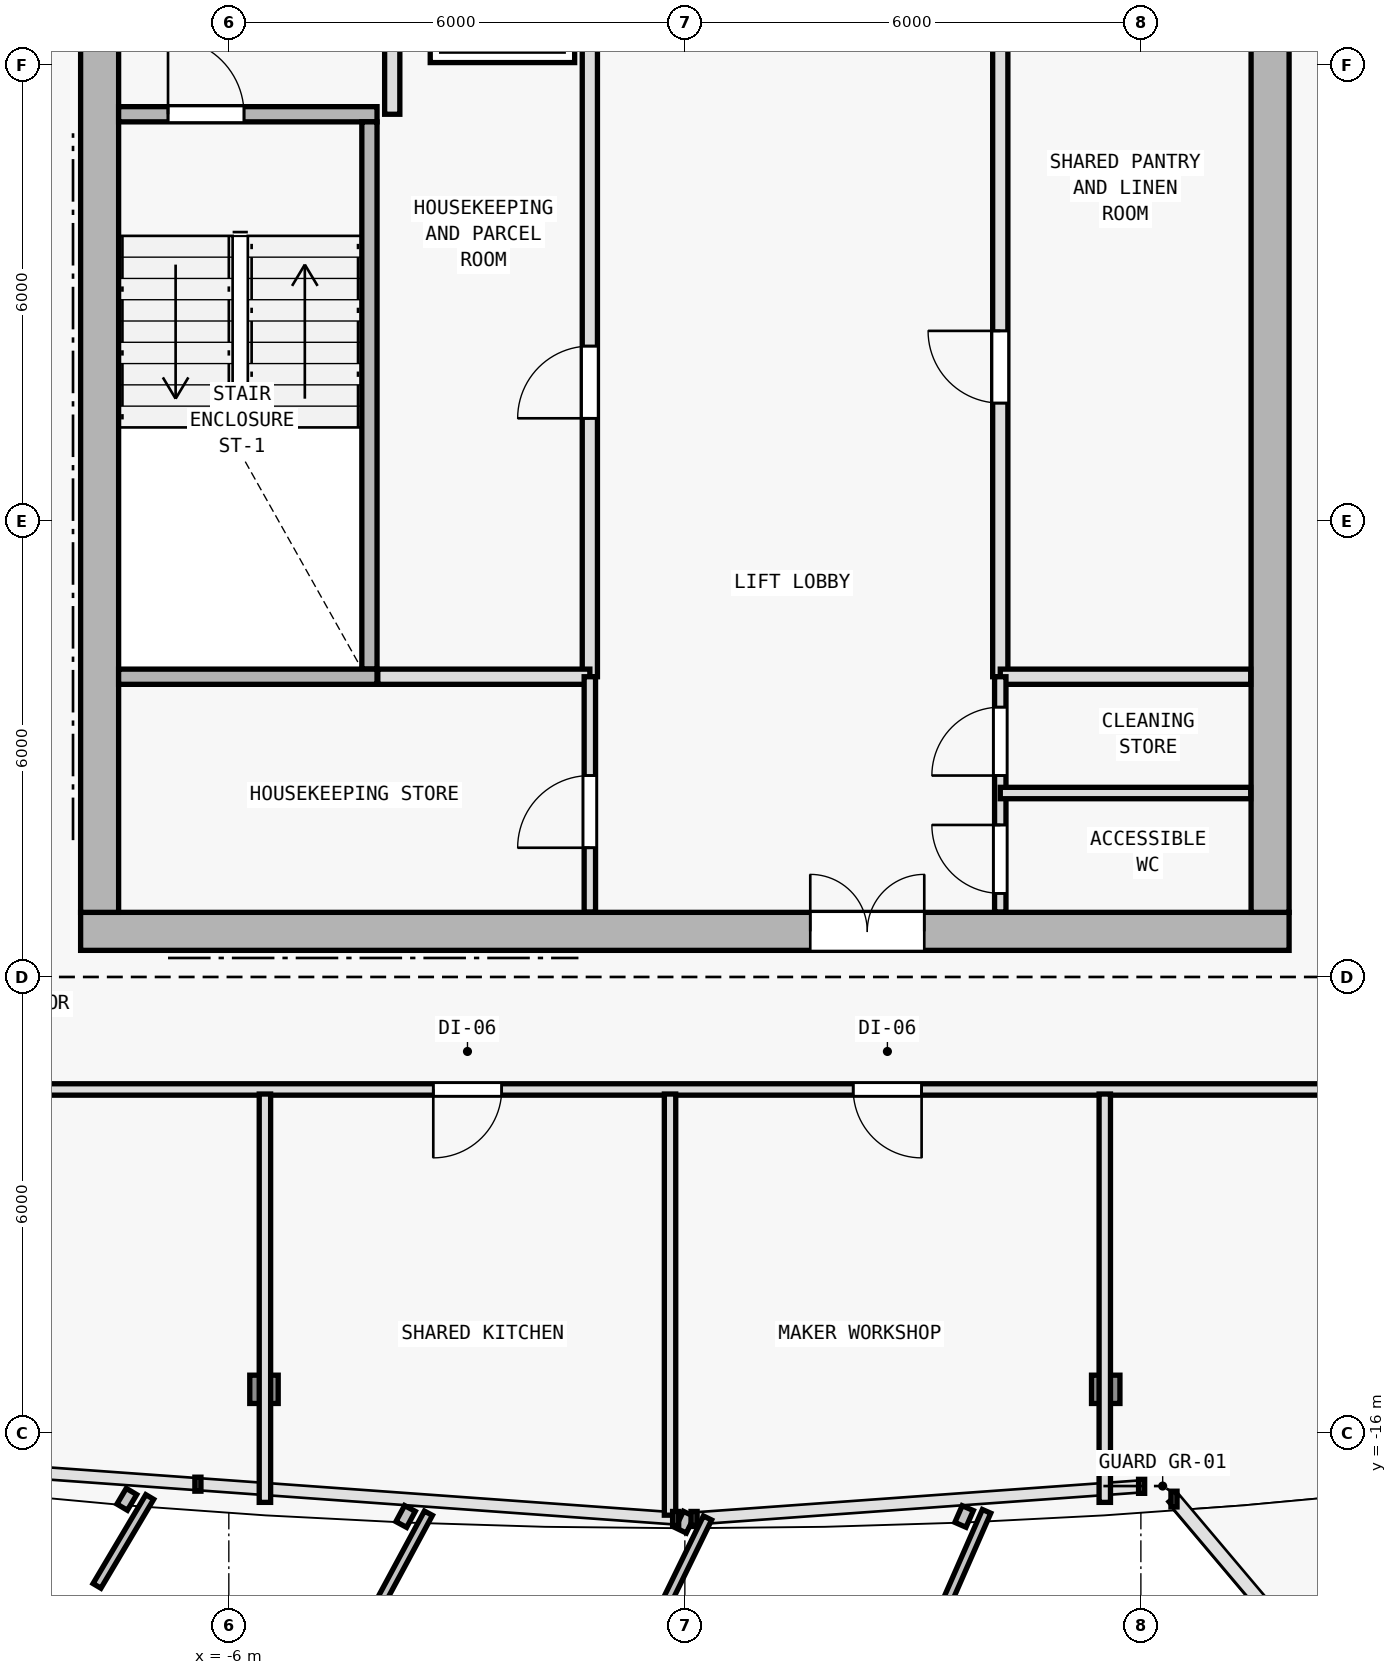
"""IFC4 building model, lengths in metres.
Left out: names, types, materials, properties, quantities, classifications, styles, units other than length and angle.
Written with IfcOpenShell. Run it as: python <this file> out.ifc"""

import sys

from ifc_helpers import new_model, si_unit, direction, frame, frame_2d, origin, origin_2d, place, context, subcontext, project, spatial, rectangle, i_section, extrude, element, fill, save


model = new_model("IFC4")
c1 = context("Model", 3, precision=1e-05, world=origin(), true_north=direction((0.0, 1.0)))
c2 = subcontext(c1, "Body", "Model", "MODEL_VIEW")
j1 = project(units=[si_unit("LENGTHUNIT", "METRE"), si_unit("PLANEANGLEUNIT", "RADIAN")], contexts=[c1])
p1 = place(None, origin())
s1 = spatial("IfcSite", under=j1, at=p1, CompositionType="ELEMENT")
p2 = place(p1, origin())
s2 = spatial("IfcBuilding", under=s1, at=p2, CompositionType="ELEMENT")
p3 = place(p2, frame((0.0, 0.0, 219.9)))
s3 = spatial("IfcBuildingStorey", under=s2, at=p3, CompositionType="ELEMENT", Elevation=219.9)
for number, where, z_axis, x_axis in (
    (1, (-7.7, -9.4, 0.0), (0.0, 0.0, 1.0), (1.0, 0.0, 0.0)),
    (2, (7.7, -9.4, 0.0), (0.0, 0.0, 1.0), (1.0, 0.0, 0.0)),
    (3, (0.0, -9.4, 0.0), (0.0, 0.0, 1.0), (1.0, 0.0, 0.0)),
    (4, (7.7, 0.4, 0.0), (0.0, 0.0, 1.0), (1.0, 0.0, 0.0)),
    (5, (-7.7, 2.0, 0.0), (0.0, 0.0, 1.0), (1.0, 0.0, 0.0)),
):
    element("IfcColumn", number, at=place(p3, frame(where, z_axis=z_axis, x_axis=x_axis)), inside=s3, PredefinedType="COLUMN", context=c2, shape_type="SweptSolid", body=[
        extrude(i_section(OverallWidth=0.398, OverallDepth=0.387, WebThickness=0.013, FlangeThickness=0.022, FilletRadius=0.015, at=origin_2d()), origin(), (0.0, 0.0, 1.0), 3.6),
    ])
for number, where, z_axis, x_axis in (
    (6, (-5.537, -15.425, 0.006), (0.007, 0.035, 0.999), (-0.982, 0.191, 0.0)),
    (7, (5.537, -15.425, 0.006), (-0.007, 0.035, 0.999), (-0.982, -0.191, 0.0)),
):
    element("IfcColumn", number, at=place(p3, frame(where, z_axis=z_axis, x_axis=x_axis)), inside=s3, PredefinedType="COLUMN", context=c2, shape_type="SweptSolid", body=[
        extrude(i_section(OverallWidth=0.374, OverallDepth=0.372, WebThickness=0.012, FlangeThickness=0.02, FilletRadius=0.015, at=origin_2d()), origin(), (0.0, 0.0, 1.0), 3.591),
    ])
p4 = place(p3, frame((-7.95, -9.4, 0.0), z_axis=(0.0, 0.0, 1.0), x_axis=(1.0, 0.0, 0.0)))
e8 = element("IfcWall", 8, at=p4, inside=s3, PredefinedType="SHEAR", context=c2, shape_type="SweptSolid", body=[
    extrude(rectangle(XDim=15.9, YDim=0.5, at=frame_2d((7.95, 0.0))), origin(), (0.0, 0.0, 1.0), 3.35),
])
p5 = place(p4, frame((9.6, 0.0, 0.0)))
e9 = element("IfcOpeningElement", 9, at=p5, cuts=e8, PredefinedType="OPENING", context=c2, shape_type="SweptSolid", body=[
    extrude(rectangle(XDim=1.5, YDim=2.2, at=frame_2d((0.75, 1.1))), frame((0.0, 0.26, 0.0), z_axis=(0.0, -1.0, 0.0), x_axis=(1.0, 0.0, 0.0)), (0.0, 0.0, 1.0), 0.52),
])
p6 = place(p3, frame((-7.7, -9.15, 0.0), z_axis=(0.0, 0.0, 1.0), x_axis=(0.0, 1.0, 0.0)))
e10 = element("IfcWall", 10, at=p6, inside=s3, PredefinedType="SHEAR", context=c2, shape_type="SweptSolid", body=[
    extrude(rectangle(XDim=19.1, YDim=0.5, at=frame_2d((9.55, 0.0))), origin(), (0.0, 0.0, 1.0), 3.35),
])
p7 = place(p6, frame((12.7, 0.0, 0.0)))
e11 = element("IfcOpeningElement", 11, at=p7, cuts=e10, PredefinedType="OPENING", context=c2, shape_type="SweptSolid", body=[
    extrude(rectangle(XDim=1.1, YDim=2.15, at=frame_2d((0.55, 1.075))), frame((0.0, 0.26, 0.0), z_axis=(0.0, -1.0, 0.0), x_axis=(1.0, 0.0, 0.0)), (0.0, 0.0, 1.0), 0.52),
])
p8 = place(p3, frame((7.7, 9.95, 0.0), z_axis=(0.0, 0.0, 1.0), x_axis=(0.0, -1.0, 0.0)))
e12 = element("IfcWall", 12, at=p8, inside=s3, PredefinedType="SHEAR", context=c2, shape_type="SweptSolid", body=[
    extrude(rectangle(XDim=19.1, YDim=0.5, at=frame_2d((9.55, 0.0))), origin(), (0.0, 0.0, 1.0), 3.35),
])
p9 = place(p3, frame((-7.45, 1.35, 0.0), z_axis=(0.0, 0.0, 1.0), x_axis=(1.0, 0.0, 0.0)))
e13 = element("IfcWall", 13, at=p9, inside=s3, PredefinedType="SOLIDWALL", context=c2, shape_type="SweptSolid", body=[
    extrude(rectangle(XDim=3.4, YDim=0.2, at=frame_2d((1.7, 0.0))), origin(), (0.0, 0.0, 1.0), 3.35),
])
p10 = place(p9, frame((0.65, 0.0, 0.0)))
e14 = element("IfcOpeningElement", 14, at=p10, cuts=e13, PredefinedType="OPENING", context=c2, shape_type="SweptSolid", body=[
    extrude(rectangle(XDim=1.0, YDim=2.15, at=frame_2d((0.5, 1.075))), frame((0.0, 0.11, 0.0), z_axis=(0.0, -1.0, 0.0), x_axis=(1.0, 0.0, 0.0)), (0.0, 0.0, 1.0), 0.22),
])
p11 = place(p3, frame((-4.15, -5.95, 0.0), z_axis=(0.0, 0.0, 1.0), x_axis=(0.0, 1.0, 0.0)))
e15 = element("IfcWall", 15, at=p11, inside=s3, PredefinedType="SOLIDWALL", context=c2, shape_type="SweptSolid", body=[
    extrude(rectangle(XDim=7.2, YDim=0.2, at=frame_2d((3.6, 0.0))), origin(), (0.0, 0.0, 1.0), 3.35),
])
p12 = place(p3, frame((-3.85, 1.35, 0.0), z_axis=(0.0, 0.0, 1.0), x_axis=(0.0, 1.0, 0.0)))
e16 = element("IfcWall", 16, at=p12, inside=s3, PredefinedType="SOLIDWALL", context=c2, shape_type="SweptSolid", body=[
    extrude(rectangle(XDim=8.595, YDim=0.2, at=frame_2d((4.297, 0.0))), origin(), (0.0, 0.0, 1.0), 3.35),
])
p13 = place(p12, frame((1.5, 0.0, 0.0)))
e17 = element("IfcOpeningElement", 17, at=p13, cuts=e16, PredefinedType="OPENING", context=c2, shape_type="SweptSolid", body=[
    extrude(rectangle(XDim=1.0, YDim=2.15, at=frame_2d((0.5, 1.075))), frame((0.0, 0.11, 0.0), z_axis=(0.0, -1.0, 0.0), x_axis=(1.0, 0.0, 0.0)), (0.0, 0.0, 1.0), 0.22),
])
p14 = place(p12, frame((3.18, 0.0, 0.0)))
e18 = element("IfcOpeningElement", 18, at=p14, cuts=e16, PredefinedType="OPENING", context=c2, shape_type="SweptSolid", body=[
    extrude(rectangle(XDim=1.0, YDim=2.15, at=frame_2d((0.5, 1.075))), frame((0.0, 0.11, 0.0), z_axis=(0.0, -1.0, 0.0), x_axis=(1.0, 0.0, 0.0)), (0.0, 0.0, 1.0), 0.22),
])
p15 = place(p3, frame((4.15, -6.05, 0.0), z_axis=(0.0, 0.0, 1.0), x_axis=(0.0, 1.0, 0.0)))
e19 = element("IfcWall", 19, at=p15, inside=s3, PredefinedType="SOLIDWALL", context=c2, shape_type="SweptSolid", body=[
    extrude(rectangle(XDim=8.7, YDim=0.2, at=frame_2d((4.35, 0.0))), origin(), (0.0, 0.0, 1.0), 3.35),
])
p16 = place(p15, frame((3.6, 0.0, 0.0)))
e20 = element("IfcOpeningElement", 20, at=p16, cuts=e19, PredefinedType="OPENING", context=c2, shape_type="SweptSolid", body=[
    extrude(rectangle(XDim=0.95, YDim=2.1, at=frame_2d((0.475, 1.05))), frame((0.0, 0.11, 0.0), z_axis=(0.0, -1.0, 0.0), x_axis=(1.0, 0.0, 0.0)), (0.0, 0.0, 1.0), 0.22),
])
p17 = place(p3, frame((-1.25, -6.05, 0.0), z_axis=(0.0, 0.0, 1.0), x_axis=(0.0, 1.0, 0.0)))
e21 = element("IfcWall", 21, at=p17, inside=s3, PredefinedType="SOLIDWALL", context=c2, shape_type="SweptSolid", body=[
    extrude(rectangle(XDim=8.7, YDim=0.2, at=frame_2d((4.35, 0.0))), origin(), (0.0, 0.0, 1.0), 3.35),
])
p18 = place(p17, frame((3.4, 0.0, 0.0)))
e22 = element("IfcOpeningElement", 22, at=p18, cuts=e21, PredefinedType="OPENING", context=c2, shape_type="SweptSolid", body=[
    extrude(rectangle(XDim=0.95, YDim=2.1, at=frame_2d((0.475, 1.05))), frame((0.0, 0.11, 0.0), z_axis=(0.0, -1.0, 0.0), x_axis=(1.0, 0.0, 0.0)), (0.0, 0.0, 1.0), 0.22),
])
p19 = place(p3, frame((-7.45, -6.05, 0.0), z_axis=(0.0, 0.0, 1.0), x_axis=(1.0, 0.0, 0.0)))
e23 = element("IfcWall", 23, at=p19, inside=s3, PredefinedType="SOLIDWALL", context=c2, shape_type="SweptSolid", body=[
    extrude(rectangle(XDim=3.4, YDim=0.2, at=frame_2d((1.7, 0.0))), origin(), (0.0, 0.0, 1.0), 3.35),
])
p20 = place(p3, frame((-4.04, -6.05, 0.0), z_axis=(0.0, 0.0, 1.0), x_axis=(1.0, 0.0, 0.0)))
e24 = element("IfcWall", 24, at=p20, inside=s3, PredefinedType="SOLIDWALL", context=c2, shape_type="SweptSolid", body=[
    extrude(rectangle(XDim=2.79, YDim=0.2, at=frame_2d((1.395, 0.0))), origin(), (0.0, 0.0, 1.0), 3.35),
])
p21 = place(p3, frame((4.15, -6.05, 0.0), z_axis=(0.0, 0.0, 1.0), x_axis=(1.0, 0.0, 0.0)))
e25 = element("IfcWall", 25, at=p21, inside=s3, PredefinedType="SOLIDWALL", context=c2, shape_type="SweptSolid", body=[
    extrude(rectangle(XDim=3.295, YDim=0.2, at=frame_2d((1.647, 0.0))), origin(), (0.0, 0.0, 1.0), 3.35),
])
p22 = place(p3, frame((-1.25, -9.145, 0.0), z_axis=(0.0, 0.0, 1.0), x_axis=(0.0, 1.0, 0.0)))
e26 = element("IfcWall", 26, at=p22, inside=s3, PredefinedType="PARTITIONING", context=c2, shape_type="SweptSolid", body=[
    extrude(rectangle(XDim=3.095, YDim=0.15, at=frame_2d((1.547, 0.0))), origin(), (0.0, 0.0, 1.0), 3.35),
])
p23 = place(p22, frame((0.845, 0.0, 0.0)))
e27 = element("IfcOpeningElement", 27, at=p23, cuts=e26, PredefinedType="OPENING", context=c2, shape_type="SweptSolid", body=[
    extrude(rectangle(XDim=0.95, YDim=2.1, at=frame_2d((0.475, 1.05))), frame((0.0, 0.085, 0.0), z_axis=(0.0, -1.0, 0.0), x_axis=(1.0, 0.0, 0.0)), (0.0, 0.0, 1.0), 0.17),
])
p24 = place(p3, frame((4.15, -9.145, 0.0), z_axis=(0.0, 0.0, 1.0), x_axis=(0.0, 1.0, 0.0)))
e28 = element("IfcWall", 28, at=p24, inside=s3, PredefinedType="PARTITIONING", context=c2, shape_type="SweptSolid", body=[
    extrude(rectangle(XDim=3.095, YDim=0.15, at=frame_2d((1.547, 0.0))), origin(), (0.0, 0.0, 1.0), 3.35),
])
p25 = place(p24, frame((0.245, 0.0, 0.0)))
e29 = element("IfcOpeningElement", 29, at=p25, cuts=e28, PredefinedType="OPENING", context=c2, shape_type="SweptSolid", body=[
    extrude(rectangle(XDim=0.9, YDim=2.1, at=frame_2d((0.45, 1.05))), frame((0.0, 0.085, 0.0), z_axis=(0.0, -1.0, 0.0), x_axis=(1.0, 0.0, 0.0)), (0.0, 0.0, 1.0), 0.17),
])
p26 = place(p24, frame((1.795, 0.0, 0.0)))
e30 = element("IfcOpeningElement", 30, at=p26, cuts=e28, PredefinedType="OPENING", context=c2, shape_type="SweptSolid", body=[
    extrude(rectangle(XDim=0.9, YDim=2.1, at=frame_2d((0.45, 1.05))), frame((0.0, 0.085, 0.0), z_axis=(0.0, -1.0, 0.0), x_axis=(1.0, 0.0, 0.0)), (0.0, 0.0, 1.0), 0.17),
])
p27 = place(p3, frame((4.15, -7.58, 0.0), z_axis=(0.0, 0.0, 1.0), x_axis=(1.0, 0.0, 0.0)))
e31 = element("IfcWall", 31, at=p27, inside=s3, PredefinedType="PARTITIONING", context=c2, shape_type="SweptSolid", body=[
    extrude(rectangle(XDim=3.295, YDim=0.15, at=frame_2d((1.647, 0.0))), origin(), (0.0, 0.0, 1.0), 3.35),
])
p28 = place(p3, frame((9.78, -11.48, 0.0), z_axis=(0.0, 0.0, 1.0), x_axis=(-1.0, 0.0, 0.0)))
e32 = element("IfcWall", 32, at=p28, inside=s3, PredefinedType="PARTITIONING", context=c2, shape_type="SweptSolid", body=[
    extrude(rectangle(XDim=19.56, YDim=0.15, at=frame_2d((9.78, 0.0))), origin(), (0.0, 0.0, 1.0), 3.005),
])
p29 = place(p28, frame((12.19, 0.0, 0.0)))
e33 = element("IfcOpeningElement", 33, at=p29, cuts=e32, PredefinedType="OPENING", context=c2, shape_type="SweptSolid", body=[
    extrude(rectangle(XDim=0.9, YDim=2.1, at=frame_2d((0.45, 1.05))), frame((0.0, 0.085, 0.0), z_axis=(0.0, -1.0, 0.0), x_axis=(1.0, 0.0, 0.0)), (0.0, 0.0, 1.0), 0.17),
])
p30 = place(p28, frame((6.665, 0.0, 0.0)))
e34 = element("IfcOpeningElement", 34, at=p30, cuts=e32, PredefinedType="OPENING", context=c2, shape_type="SweptSolid", body=[
    extrude(rectangle(XDim=0.9, YDim=2.1, at=frame_2d((0.45, 1.05))), frame((0.0, 0.085, 0.0), z_axis=(0.0, -1.0, 0.0), x_axis=(1.0, 0.0, 0.0)), (0.0, 0.0, 1.0), 0.17),
])
p31 = place(p3, frame((-5.525, -11.54, 0.0), z_axis=(0.0, 0.0, 1.0), x_axis=(0.0, -1.0, 0.0)))
e35 = element("IfcWall", 35, at=p31, inside=s3, PredefinedType="PARTITIONING", context=c2, shape_type="SweptSolid", body=[
    extrude(rectangle(XDim=5.372, YDim=0.15, at=frame_2d((2.686, 0.0))), origin(), (0.0, 0.0, 1.0), 2.965),
])
p32 = place(p3, frame((5.525, -11.54, 0.0), z_axis=(0.0, 0.0, 1.0), x_axis=(0.0, -1.0, 0.0)))
e36 = element("IfcWall", 36, at=p32, inside=s3, PredefinedType="PARTITIONING", context=c2, shape_type="SweptSolid", body=[
    extrude(rectangle(XDim=5.372, YDim=0.15, at=frame_2d((2.686, 0.0))), origin(), (0.0, 0.0, 1.0), 2.975),
])
p33 = place(p3, frame((-0.195, -11.54, 0.0), z_axis=(0.0, 0.0, 1.0), x_axis=(0.0, -1.0, 0.0)))
e37 = element("IfcWall", 37, at=p33, inside=s3, PredefinedType="PARTITIONING", context=c2, shape_type="SweptSolid", body=[
    extrude(rectangle(XDim=5.541, YDim=0.15, at=frame_2d((2.771, 0.0))), origin(), (0.0, 0.0, 1.0), 2.975),
])
p34 = place(p5, origin())
e38 = element("IfcDoor", 38, at=p34, inside=s3, OperationType="DOUBLE_DOOR_SINGLE_SWING", PredefinedType="DOOR", context=c2, shape_type="SweptSolid", body=[
    extrude(rectangle(XDim=1.5, YDim=2.2, at=frame_2d((0.75, 1.1))), frame((0.0, 0.025, 0.0), z_axis=(0.0, -1.0, 0.0), x_axis=(1.0, 0.0, 0.0)), (0.0, 0.0, 1.0), 0.05),
])
fill(e9, e38)
p35 = place(p10, origin())
e39 = element("IfcDoor", 39, at=p35, inside=s3, OperationType="SINGLE_SWING_LEFT", PredefinedType="DOOR", context=c2, shape_type="SweptSolid", body=[
    extrude(rectangle(XDim=1.0, YDim=2.15, at=frame_2d((0.5, 1.075))), frame((0.0, 0.025, 0.0), z_axis=(0.0, -1.0, 0.0), x_axis=(1.0, 0.0, 0.0)), (0.0, 0.0, 1.0), 0.05),
])
fill(e14, e39)
p36 = place(p16, origin())
e40 = element("IfcDoor", 40, at=p36, inside=s3, OperationType="SINGLE_SWING_RIGHT", PredefinedType="DOOR", context=c2, shape_type="SweptSolid", body=[
    extrude(rectangle(XDim=0.95, YDim=2.1, at=frame_2d((0.475, 1.05))), frame((0.0, 0.025, 0.0), z_axis=(0.0, -1.0, 0.0), x_axis=(1.0, 0.0, 0.0)), (0.0, 0.0, 1.0), 0.05),
])
fill(e20, e40)
p37 = place(p18, origin())
e41 = element("IfcDoor", 41, at=p37, inside=s3, OperationType="SINGLE_SWING_LEFT", PredefinedType="DOOR", context=c2, shape_type="SweptSolid", body=[
    extrude(rectangle(XDim=0.95, YDim=2.1, at=frame_2d((0.475, 1.05))), frame((0.0, 0.025, 0.0), z_axis=(0.0, -1.0, 0.0), x_axis=(1.0, 0.0, 0.0)), (0.0, 0.0, 1.0), 0.05),
])
fill(e22, e41)
p38 = place(p23, origin())
e42 = element("IfcDoor", 42, at=p38, inside=s3, OperationType="SINGLE_SWING_LEFT", PredefinedType="DOOR", context=c2, shape_type="SweptSolid", body=[
    extrude(rectangle(XDim=0.95, YDim=2.1, at=frame_2d((0.475, 1.05))), frame((0.0, 0.025, 0.0), z_axis=(0.0, -1.0, 0.0), x_axis=(1.0, 0.0, 0.0)), (0.0, 0.0, 1.0), 0.05),
])
fill(e27, e42)
p39 = place(p25, origin())
e43 = element("IfcDoor", 43, at=p39, inside=s3, OperationType="SINGLE_SWING_RIGHT", PredefinedType="DOOR", context=c2, shape_type="SweptSolid", body=[
    extrude(rectangle(XDim=0.9, YDim=2.1, at=frame_2d((0.45, 1.05))), frame((0.0, 0.025, 0.0), z_axis=(0.0, -1.0, 0.0), x_axis=(1.0, 0.0, 0.0)), (0.0, 0.0, 1.0), 0.05),
])
fill(e29, e43)
p40 = place(p26, origin())
e44 = element("IfcDoor", 44, at=p40, inside=s3, OperationType="SINGLE_SWING_LEFT", PredefinedType="DOOR", context=c2, shape_type="SweptSolid", body=[
    extrude(rectangle(XDim=0.9, YDim=2.1, at=frame_2d((0.45, 1.05))), frame((0.0, 0.025, 0.0), z_axis=(0.0, -1.0, 0.0), x_axis=(1.0, 0.0, 0.0)), (0.0, 0.0, 1.0), 0.05),
])
fill(e30, e44)
p41 = place(p29, origin())
e45 = element("IfcDoor", 45, at=p41, inside=s3, OperationType="SINGLE_SWING_RIGHT", PredefinedType="DOOR", context=c2, shape_type="SweptSolid", body=[
    extrude(rectangle(XDim=0.9, YDim=2.1, at=frame_2d((0.45, 1.05))), frame((0.0, 0.025, 0.0), z_axis=(0.0, -1.0, 0.0), x_axis=(1.0, 0.0, 0.0)), (0.0, 0.0, 1.0), 0.05),
])
fill(e33, e45)
p42 = place(p30, origin())
e46 = element("IfcDoor", 46, at=p42, inside=s3, OperationType="SINGLE_SWING_LEFT", PredefinedType="DOOR", context=c2, shape_type="SweptSolid", body=[
    extrude(rectangle(XDim=0.9, YDim=2.1, at=frame_2d((0.45, 1.05))), frame((0.0, 0.025, 0.0), z_axis=(0.0, -1.0, 0.0), x_axis=(1.0, 0.0, 0.0)), (0.0, 0.0, 1.0), 0.05),
])
fill(e34, e46)
save(model, sys.argv[1])
